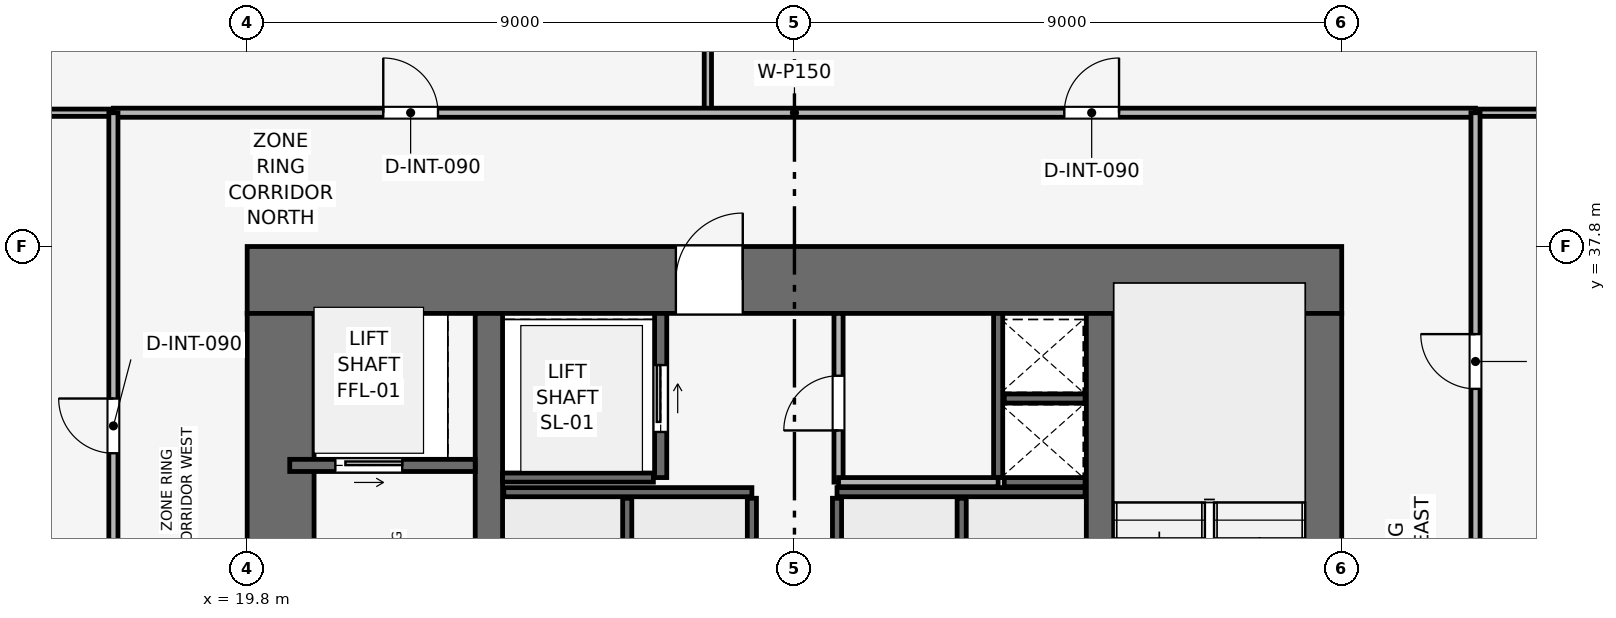
"""IFC4 building model, lengths in metres.
Left out: names, types, materials, properties, quantities, classifications, styles, units other than length and angle.
Written with IfcOpenShell. Run it as: python <this file> out.ifc"""

import sys

from ifc_helpers import new_model, si_unit, direction, frame, frame_2d, origin, place, context, subcontext, project, spatial, rectangle, extrude, element, fill, save


model = new_model("IFC4")
c1 = context("Model", 3, precision=1e-05, world=origin(), true_north=direction((0.0, 1.0)))
c2 = subcontext(c1, "Body", "Model", "MODEL_VIEW")
j1 = project(units=[si_unit("LENGTHUNIT", "METRE"), si_unit("PLANEANGLEUNIT", "RADIAN")], contexts=[c1])
p1 = place(None, origin())
s1 = spatial("IfcSite", under=j1, at=p1, CompositionType="ELEMENT")
p2 = place(p1, origin())
s2 = spatial("IfcBuilding", under=s1, at=p2, CompositionType="ELEMENT")
p3 = place(p2, frame((0.0, 0.0, 49.5)))
s3 = spatial("IfcBuildingStorey", under=s2, at=p3, CompositionType="ELEMENT", Elevation=49.5)
p4 = place(p3, frame((19.8, 37.25, 0.0), z_axis=(0.0, 0.0, 1.0), x_axis=(1.0, 0.0, 0.0)))
e1 = element("IfcWall", 1, at=p4, inside=s3, PredefinedType="SHEAR", context=c2, shape_type="SweptSolid", body=[
    extrude(rectangle(XDim=18.0, YDim=1.1, at=frame_2d((9.0, 0.0))), origin(), (0.0, 0.0, 1.0), 3.9),
])
p5 = place(p4, frame((7.05, 0.0, 0.0)))
e2 = element("IfcOpeningElement", 2, at=p5, cuts=e1, PredefinedType="OPENING", context=c2, shape_type="SweptSolid", body=[
    extrude(rectangle(XDim=1.1, YDim=2.15, at=frame_2d((0.55, 1.075))), frame((0.0, 0.56, 0.0), z_axis=(0.0, -1.0, 0.0), x_axis=(1.0, 0.0, 0.0)), (0.0, 0.0, 1.0), 1.12),
])
p6 = place(p3, frame((20.35, 20.9, 0.0), z_axis=(0.0, 0.0, 1.0), x_axis=(0.0, 1.0, 0.0)))
e3 = element("IfcWall", 3, at=p6, inside=s3, PredefinedType="SHEAR", context=c2, shape_type="SweptSolid", body=[
    extrude(rectangle(XDim=15.8, YDim=1.1, at=frame_2d((7.9, 0.0))), origin(), (0.0, 0.0, 1.0), 3.9),
])
p7 = place(p6, frame((9.9, 0.0, 0.0)))
e4 = element("IfcOpeningElement", 4, at=p7, cuts=e3, PredefinedType="OPENING", context=c2, shape_type="SweptSolid", body=[
    extrude(rectangle(XDim=1.1, YDim=2.15, at=frame_2d((0.55, 1.075))), frame((0.0, 0.56, 0.0), z_axis=(0.0, -1.0, 0.0), x_axis=(1.0, 0.0, 0.0)), (0.0, 0.0, 1.0), 1.12),
])
p8 = place(p3, frame((37.25, 20.9, 0.0), z_axis=(0.0, 0.0, 1.0), x_axis=(0.0, 1.0, 0.0)))
e5 = element("IfcWall", 5, at=p8, inside=s3, PredefinedType="SHEAR", context=c2, shape_type="SweptSolid", body=[
    extrude(rectangle(XDim=15.8, YDim=1.1, at=frame_2d((7.9, 0.0))), origin(), (0.0, 0.0, 1.0), 3.9),
])
p9 = place(p8, frame((4.4, 0.0, 0.0)))
e6 = element("IfcOpeningElement", 6, at=p9, cuts=e5, PredefinedType="OPENING", context=c2, shape_type="SweptSolid", body=[
    extrude(rectangle(XDim=1.1, YDim=2.15, at=frame_2d((0.55, 1.075))), frame((0.0, 0.56, 0.0), z_axis=(0.0, -1.0, 0.0), x_axis=(1.0, 0.0, 0.0)), (0.0, 0.0, 1.0), 1.12),
])
for number, where, z_axis, x_axis in (
    (7, (23.775, 20.9, 0.0), (0.0, 0.0, 1.0), (0.0, 1.0, 0.0)),
    (8, (33.825, 20.9, 0.0), (0.0, 0.0, 1.0), (0.0, 1.0, 0.0)),
):
    element("IfcWall", number, at=place(p3, frame(where, z_axis=z_axis, x_axis=x_axis)), inside=s3, PredefinedType="SHEAR", context=c2, shape_type="SweptSolid", body=[
        extrude(rectangle(XDim=15.8, YDim=0.45, at=frame_2d((7.9, 0.0))), origin(), (0.0, 0.0, 1.0), 3.9),
    ])
p10 = place(p3, frame((32.15, 34.0, 0.0), z_axis=(0.0, 0.0, 1.0), x_axis=(0.0, 1.0, 0.0)))
e9 = element("IfcWall", 9, at=p10, inside=s3, PredefinedType="SHEAR", context=c2, shape_type="SweptSolid", body=[
    extrude(rectangle(XDim=2.7, YDim=0.15, at=frame_2d((1.35, 0.0))), origin(), (0.0, 0.0, 1.0), 3.65),
])
for number, where, z_axis, x_axis in (
    (10, (32.25, 33.925, 0.0), (0.0, 0.0, 1.0), (1.0, 0.0, 0.0)),
    (11, (32.25, 35.3, 0.0), (0.0, 0.0, 1.0), (1.0, 0.0, 0.0)),
):
    element("IfcWall", number, at=place(p3, frame(where, z_axis=z_axis, x_axis=x_axis)), inside=s3, PredefinedType="SHEAR", context=c2, shape_type="SweptSolid", body=[
        extrude(rectangle(XDim=1.33, YDim=0.15, at=frame_2d((0.665, 0.0))), origin(), (0.0, 0.0, 1.0), 3.65),
    ])
p11 = place(p3, frame((20.5, 34.2, 0.0), z_axis=(0.0, 0.0, 1.0), x_axis=(1.0, 0.0, 0.0)))
e12 = element("IfcWall", 12, at=p11, inside=s3, PredefinedType="SHEAR", context=c2, shape_type="SweptSolid", body=[
    extrude(rectangle(XDim=3.05, YDim=0.2, at=frame_2d((1.525, 0.0))), origin(), (0.0, 0.0, 1.0), 3.65),
])
p12 = place(p11, frame((0.75, 0.0, 0.0)))
e13 = element("IfcOpeningElement", 13, at=p12, cuts=e12, PredefinedType="OPENING", context=c2, shape_type="SweptSolid", body=[
    extrude(rectangle(XDim=1.1, YDim=2.15, at=frame_2d((0.55, 1.075))), frame((0.0, 0.11, 0.0), z_axis=(0.0, -1.0, 0.0), x_axis=(1.0, 0.0, 0.0)), (0.0, 0.0, 1.0), 0.22),
])
p13 = place(p3, frame((26.6, 34.0, 0.0), z_axis=(0.0, 0.0, 1.0), x_axis=(0.0, 1.0, 0.0)))
e14 = element("IfcWall", 14, at=p13, inside=s3, PredefinedType="SHEAR", context=c2, shape_type="SweptSolid", body=[
    extrude(rectangle(XDim=2.7, YDim=0.2, at=frame_2d((1.35, 0.0))), origin(), (0.0, 0.0, 1.0), 3.65),
])
p14 = place(p13, frame((0.75, 0.0, 0.0)))
e15 = element("IfcOpeningElement", 15, at=p14, cuts=e14, PredefinedType="OPENING", context=c2, shape_type="SweptSolid", body=[
    extrude(rectangle(XDim=1.1, YDim=2.15, at=frame_2d((0.55, 1.075))), frame((0.0, 0.11, 0.0), z_axis=(0.0, -1.0, 0.0), x_axis=(1.0, 0.0, 0.0)), (0.0, 0.0, 1.0), 0.22),
])
p15 = place(p3, frame((24.0, 34.0, 0.0), z_axis=(0.0, 0.0, 1.0), x_axis=(1.0, 0.0, 0.0)))
e16 = element("IfcWall", 16, at=p15, inside=s3, PredefinedType="SHEAR", context=c2, shape_type="SweptSolid", body=[
    extrude(rectangle(XDim=2.48, YDim=0.15, at=frame_2d((1.24, 0.0))), origin(), (0.0, 0.0, 1.0), 3.65),
])
for number, where, z_axis, x_axis in (
    (17, (24.02, 33.76, 0.0), (0.0, 0.0, 1.0), (1.0, 0.0, 0.0)),
    (18, (29.5, 33.76, 0.0), (0.0, 0.0, 1.0), (1.0, 0.0, 0.0)),
):
    element("IfcWall", number, at=place(p3, frame(where, z_axis=z_axis, x_axis=x_axis)), inside=s3, PredefinedType="SHEAR", context=c2, shape_type="SweptSolid", body=[
        extrude(rectangle(XDim=4.08, YDim=0.15, at=frame_2d((2.04, 0.0))), origin(), (0.0, 0.0, 1.0), 3.65),
    ])
for number, where, z_axis, x_axis in (
    (19, (26.05, 31.42, 0.0), (0.0, 0.0, 1.0), (0.0, 1.0, 0.0)),
    (20, (28.1, 31.42, 0.0), (0.0, 0.0, 1.0), (0.0, 1.0, 0.0)),
    (21, (29.5, 31.42, 0.0), (0.0, 0.0, 1.0), (0.0, 1.0, 0.0)),
    (22, (31.55, 31.42, 0.0), (0.0, 0.0, 1.0), (0.0, 1.0, 0.0)),
):
    element("IfcWall", number, at=place(p3, frame(where, z_axis=z_axis, x_axis=x_axis)), inside=s3, PredefinedType="SHEAR", context=c2, shape_type="SweptSolid", body=[
        extrude(rectangle(XDim=2.24, YDim=0.15, at=frame_2d((1.12, 0.0))), origin(), (0.0, 0.0, 1.0), 3.65),
    ])
p16 = place(p3, frame((29.525, 33.925, 0.0), z_axis=(0.0, 0.0, 1.0), x_axis=(0.0, 1.0, 0.0)))
e23 = element("IfcWall", 23, at=p16, inside=s3, PredefinedType="PARTITIONING", context=c2, shape_type="SweptSolid", body=[
    extrude(rectangle(XDim=2.775, YDim=0.15, at=frame_2d((1.387, 0.0))), origin(), (0.0, 0.0, 1.0), 3.65),
])
p17 = place(p16, frame((0.85, 0.0, 0.0)))
e24 = element("IfcOpeningElement", 24, at=p17, cuts=e23, PredefinedType="OPENING", context=c2, shape_type="SweptSolid", body=[
    extrude(rectangle(XDim=0.9, YDim=2.1, at=frame_2d((0.45, 1.05))), frame((0.0, 0.085, 0.0), z_axis=(0.0, -1.0, 0.0), x_axis=(1.0, 0.0, 0.0)), (0.0, 0.0, 1.0), 0.17),
])
p18 = place(p3, frame((29.525, 33.925, 0.0), z_axis=(0.0, 0.0, 1.0), x_axis=(1.0, 0.0, 0.0)))
e25 = element("IfcWall", 25, at=p18, inside=s3, PredefinedType="PARTITIONING", context=c2, shape_type="SweptSolid", body=[
    extrude(rectangle(XDim=2.625, YDim=0.15, at=frame_2d((1.312, 0.0))), origin(), (0.0, 0.0, 1.0), 3.65),
])
for number, where, z_axis, x_axis in (
    (26, (27.376, 40.0, 0.0), (0.0, 0.0, 1.0), (0.0, 1.0, 0.0)),
    (27, (1.03, 40.0, 0.0), (0.0, 0.0, 1.0), (1.0, 0.0, 0.0)),
    (28, (40.0, 40.0, 0.0), (0.0, 0.0, 1.0), (1.0, 0.0, 0.0)),
):
    element("IfcWall", number, at=place(p3, frame(where, z_axis=z_axis, x_axis=x_axis)), inside=s3, PredefinedType="PARTITIONING", context=c2, shape_type="SweptSolid", body=[
        extrude(rectangle(XDim=16.57, YDim=0.12, at=frame_2d((8.285, 0.0))), origin(), (0.0, 0.0, 1.0), 2.935),
    ])
p19 = place(p3, frame((17.6, 40.0, 0.0), z_axis=(0.0, 0.0, 1.0), x_axis=(1.0, 0.0, 0.0)))
e29 = element("IfcWall", 29, at=p19, inside=s3, PredefinedType="PARTITIONING", context=c2, shape_type="SweptSolid", body=[
    extrude(rectangle(XDim=22.4, YDim=0.15, at=frame_2d((11.2, 0.0))), origin(), (0.0, 0.0, 1.0), 3.085),
])
p20 = place(p19, frame((4.438, 0.0, 0.0)))
e30 = element("IfcOpeningElement", 30, at=p20, cuts=e29, PredefinedType="OPENING", context=c2, shape_type="SweptSolid", body=[
    extrude(rectangle(XDim=0.9, YDim=2.1, at=frame_2d((0.45, 1.05))), frame((0.0, 0.085, 0.0), z_axis=(0.0, -1.0, 0.0), x_axis=(1.0, 0.0, 0.0)), (0.0, 0.0, 1.0), 0.17),
])
p21 = place(p19, frame((15.638, 0.0, 0.0)))
e31 = element("IfcOpeningElement", 31, at=p21, cuts=e29, PredefinedType="OPENING", context=c2, shape_type="SweptSolid", body=[
    extrude(rectangle(XDim=0.9, YDim=2.1, at=frame_2d((0.45, 1.05))), frame((0.0, 0.085, 0.0), z_axis=(0.0, -1.0, 0.0), x_axis=(1.0, 0.0, 0.0)), (0.0, 0.0, 1.0), 0.17),
])
p22 = place(p3, frame((17.6, 17.6, 0.0), z_axis=(0.0, 0.0, 1.0), x_axis=(0.0, 1.0, 0.0)))
e32 = element("IfcWall", 32, at=p22, inside=s3, PredefinedType="PARTITIONING", context=c2, shape_type="SweptSolid", body=[
    extrude(rectangle(XDim=22.4, YDim=0.15, at=frame_2d((11.2, 0.0))), origin(), (0.0, 0.0, 1.0), 3.085),
])
p23 = place(p22, frame((1.4, 0.0, 0.0)))
e33 = element("IfcOpeningElement", 33, at=p23, cuts=e32, PredefinedType="OPENING", context=c2, shape_type="SweptSolid", body=[
    extrude(rectangle(XDim=0.9, YDim=2.1, at=frame_2d((0.45, 1.05))), frame((0.0, 0.085, 0.0), z_axis=(0.0, -1.0, 0.0), x_axis=(1.0, 0.0, 0.0)), (0.0, 0.0, 1.0), 0.17),
])
p24 = place(p22, frame((4.65, 0.0, 0.0)))
e34 = element("IfcOpeningElement", 34, at=p24, cuts=e32, PredefinedType="OPENING", context=c2, shape_type="SweptSolid", body=[
    extrude(rectangle(XDim=0.9, YDim=2.1, at=frame_2d((0.45, 1.05))), frame((0.0, 0.085, 0.0), z_axis=(0.0, -1.0, 0.0), x_axis=(1.0, 0.0, 0.0)), (0.0, 0.0, 1.0), 0.17),
])
p25 = place(p22, frame((7.55, 0.0, 0.0)))
e35 = element("IfcOpeningElement", 35, at=p25, cuts=e32, PredefinedType="OPENING", context=c2, shape_type="SweptSolid", body=[
    extrude(rectangle(XDim=0.9, YDim=2.1, at=frame_2d((0.45, 1.05))), frame((0.0, 0.085, 0.0), z_axis=(0.0, -1.0, 0.0), x_axis=(1.0, 0.0, 0.0)), (0.0, 0.0, 1.0), 0.17),
])
p26 = place(p22, frame((10.3, 0.0, 0.0)))
e36 = element("IfcOpeningElement", 36, at=p26, cuts=e32, PredefinedType="OPENING", context=c2, shape_type="SweptSolid", body=[
    extrude(rectangle(XDim=0.95, YDim=2.1, at=frame_2d((0.475, 1.05))), frame((0.0, 0.085, 0.0), z_axis=(0.0, -1.0, 0.0), x_axis=(1.0, 0.0, 0.0)), (0.0, 0.0, 1.0), 0.17),
])
p27 = place(p22, frame((16.8, 0.0, 0.0)))
e37 = element("IfcOpeningElement", 37, at=p27, cuts=e32, PredefinedType="OPENING", context=c2, shape_type="SweptSolid", body=[
    extrude(rectangle(XDim=0.9, YDim=2.1, at=frame_2d((0.45, 1.05))), frame((0.0, 0.085, 0.0), z_axis=(0.0, -1.0, 0.0), x_axis=(1.0, 0.0, 0.0)), (0.0, 0.0, 1.0), 0.17),
])
p28 = place(p3, frame((40.0, 17.6, 0.0), z_axis=(0.0, 0.0, 1.0), x_axis=(0.0, 1.0, 0.0)))
e38 = element("IfcWall", 38, at=p28, inside=s3, PredefinedType="PARTITIONING", context=c2, shape_type="SweptSolid", body=[
    extrude(rectangle(XDim=22.4, YDim=0.15, at=frame_2d((11.2, 0.0))), origin(), (0.0, 0.0, 1.0), 3.085),
])
p29 = place(p28, frame((0.7, 0.0, 0.0)))
e39 = element("IfcOpeningElement", 39, at=p29, cuts=e38, PredefinedType="OPENING", context=c2, shape_type="SweptSolid", body=[
    extrude(rectangle(XDim=0.9, YDim=2.1, at=frame_2d((0.45, 1.05))), frame((0.0, 0.085, 0.0), z_axis=(0.0, -1.0, 0.0), x_axis=(1.0, 0.0, 0.0)), (0.0, 0.0, 1.0), 0.17),
])
p30 = place(p28, frame((4.927, 0.0, 0.0)))
e40 = element("IfcOpeningElement", 40, at=p30, cuts=e38, PredefinedType="OPENING", context=c2, shape_type="SweptSolid", body=[
    extrude(rectangle(XDim=0.9, YDim=2.1, at=frame_2d((0.45, 1.05))), frame((0.0, 0.085, 0.0), z_axis=(0.0, -1.0, 0.0), x_axis=(1.0, 0.0, 0.0)), (0.0, 0.0, 1.0), 0.17),
])
p31 = place(p28, frame((10.886, 0.0, 0.0)))
e41 = element("IfcOpeningElement", 41, at=p31, cuts=e38, PredefinedType="OPENING", context=c2, shape_type="SweptSolid", body=[
    extrude(rectangle(XDim=0.9, YDim=2.1, at=frame_2d((0.45, 1.05))), frame((0.0, 0.085, 0.0), z_axis=(0.0, -1.0, 0.0), x_axis=(1.0, 0.0, 0.0)), (0.0, 0.0, 1.0), 0.17),
])
p32 = place(p28, frame((17.859, 0.0, 0.0)))
e42 = element("IfcOpeningElement", 42, at=p32, cuts=e38, PredefinedType="OPENING", context=c2, shape_type="SweptSolid", body=[
    extrude(rectangle(XDim=0.9, YDim=2.1, at=frame_2d((0.45, 1.05))), frame((0.0, 0.085, 0.0), z_axis=(0.0, -1.0, 0.0), x_axis=(1.0, 0.0, 0.0)), (0.0, 0.0, 1.0), 0.17),
])
p33 = place(p12, origin())
e43 = element("IfcDoor", 43, at=p33, inside=s3, OperationType="SLIDING_TO_RIGHT", PredefinedType="DOOR", context=c2, shape_type="SweptSolid", body=[
    extrude(rectangle(XDim=1.1, YDim=2.15, at=frame_2d((0.55, 1.075))), frame((0.0, 0.025, 0.0), z_axis=(0.0, -1.0, 0.0), x_axis=(1.0, 0.0, 0.0)), (0.0, 0.0, 1.0), 0.05),
])
fill(e13, e43)
p34 = place(p14, origin())
e44 = element("IfcDoor", 44, at=p34, inside=s3, OperationType="SLIDING_TO_RIGHT", PredefinedType="DOOR", context=c2, shape_type="SweptSolid", body=[
    extrude(rectangle(XDim=1.1, YDim=2.15, at=frame_2d((0.55, 1.075))), frame((0.0, 0.025, 0.0), z_axis=(0.0, -1.0, 0.0), x_axis=(1.0, 0.0, 0.0)), (0.0, 0.0, 1.0), 0.05),
])
fill(e15, e44)
p35 = place(p17, origin())
e45 = element("IfcDoor", 45, at=p35, inside=s3, OperationType="SINGLE_SWING_LEFT", PredefinedType="DOOR", context=c2, shape_type="SweptSolid", body=[
    extrude(rectangle(XDim=0.9, YDim=2.1, at=frame_2d((0.45, 1.05))), frame((0.0, 0.025, 0.0), z_axis=(0.0, -1.0, 0.0), x_axis=(1.0, 0.0, 0.0)), (0.0, 0.0, 1.0), 0.05),
])
fill(e24, e45)
p36 = place(p20, origin())
e46 = element("IfcDoor", 46, at=p36, inside=s3, OperationType="SINGLE_SWING_LEFT", PredefinedType="DOOR", context=c2, shape_type="SweptSolid", body=[
    extrude(rectangle(XDim=0.9, YDim=2.1, at=frame_2d((0.45, 1.05))), frame((0.0, 0.025, 0.0), z_axis=(0.0, -1.0, 0.0), x_axis=(1.0, 0.0, 0.0)), (0.0, 0.0, 1.0), 0.05),
])
fill(e30, e46)
p37 = place(p21, origin())
e47 = element("IfcDoor", 47, at=p37, inside=s3, OperationType="SINGLE_SWING_RIGHT", PredefinedType="DOOR", context=c2, shape_type="SweptSolid", body=[
    extrude(rectangle(XDim=0.9, YDim=2.1, at=frame_2d((0.45, 1.05))), frame((0.0, 0.025, 0.0), z_axis=(0.0, -1.0, 0.0), x_axis=(1.0, 0.0, 0.0)), (0.0, 0.0, 1.0), 0.05),
])
fill(e31, e47)
p38 = place(p27, origin())
e48 = element("IfcDoor", 48, at=p38, inside=s3, OperationType="SINGLE_SWING_RIGHT", PredefinedType="DOOR", context=c2, shape_type="SweptSolid", body=[
    extrude(rectangle(XDim=0.9, YDim=2.1, at=frame_2d((0.45, 1.05))), frame((0.0, 0.025, 0.0), z_axis=(0.0, -1.0, 0.0), x_axis=(1.0, 0.0, 0.0)), (0.0, 0.0, 1.0), 0.05),
])
fill(e37, e48)
p39 = place(p32, origin())
e49 = element("IfcDoor", 49, at=p39, inside=s3, OperationType="SINGLE_SWING_RIGHT", PredefinedType="DOOR", context=c2, shape_type="SweptSolid", body=[
    extrude(rectangle(XDim=0.9, YDim=2.1, at=frame_2d((0.45, 1.05))), frame((0.0, 0.025, 0.0), z_axis=(0.0, -1.0, 0.0), x_axis=(1.0, 0.0, 0.0)), (0.0, 0.0, 1.0), 0.05),
])
fill(e42, e49)
p40 = place(p5, origin())
e50 = element("IfcDoor", 50, at=p40, inside=s3, OperationType="SINGLE_SWING_RIGHT", PredefinedType="DOOR", context=c2, shape_type="SweptSolid", body=[
    extrude(rectangle(XDim=1.1, YDim=2.15, at=frame_2d((0.55, 1.075))), frame((0.0, 0.025, 0.0), z_axis=(0.0, -1.0, 0.0), x_axis=(1.0, 0.0, 0.0)), (0.0, 0.0, 1.0), 0.05),
])
fill(e2, e50)
save(model, sys.argv[1])
